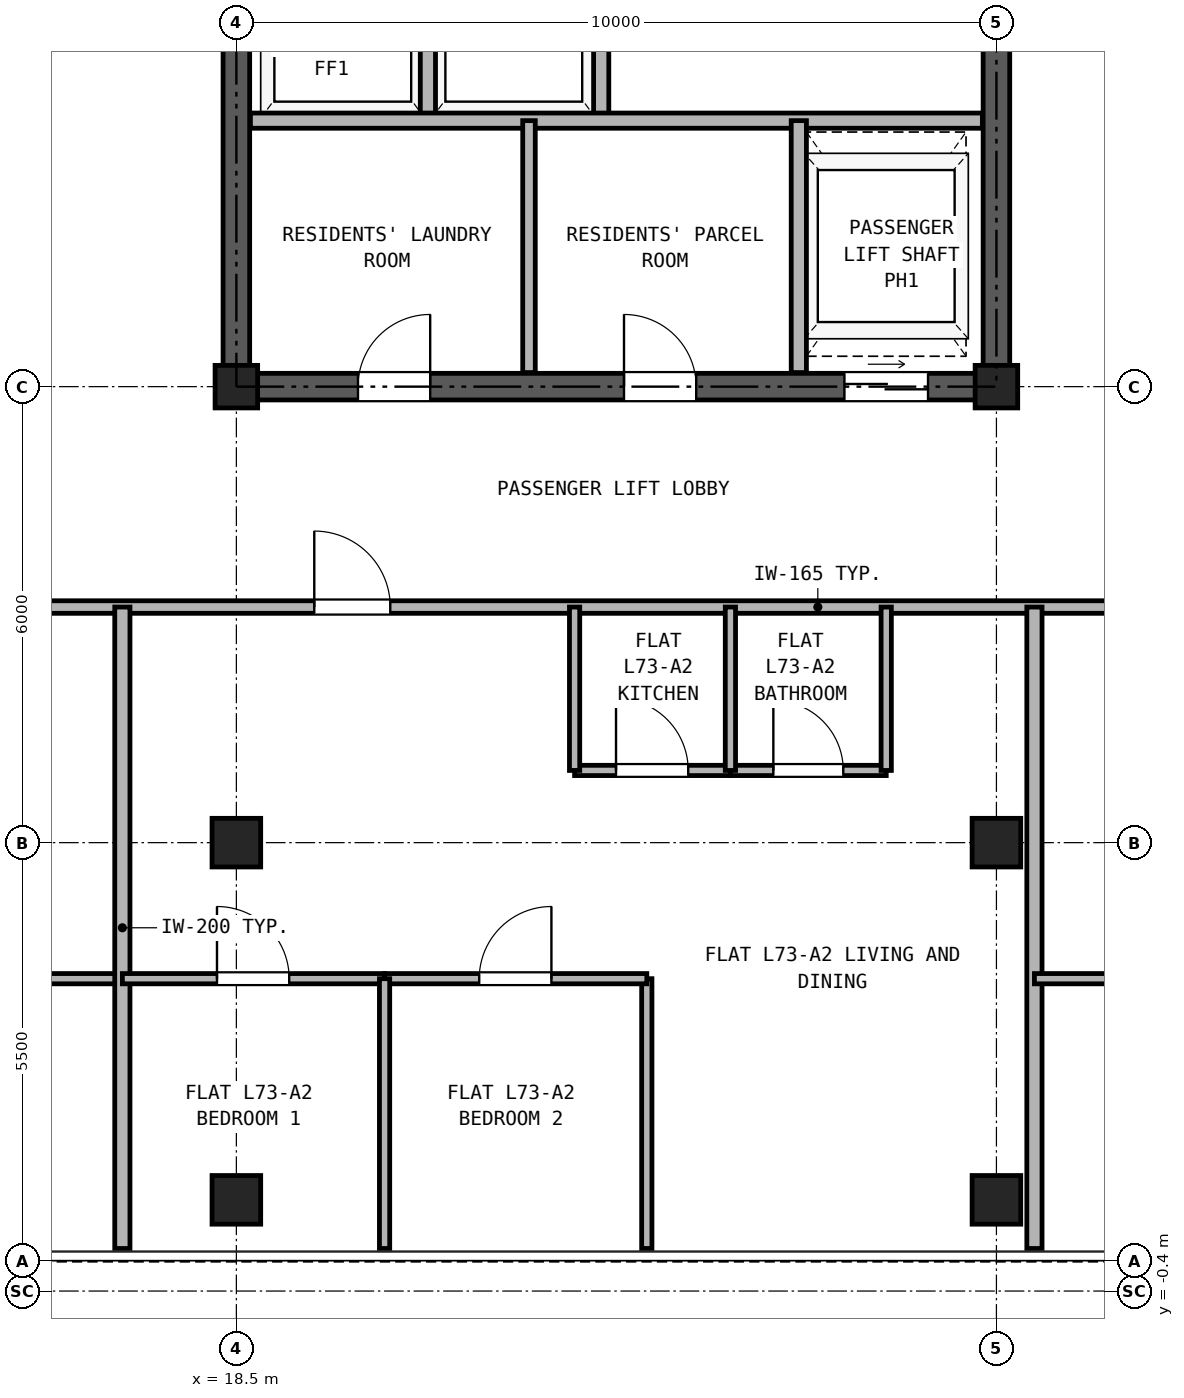
"""IFC4 building model, lengths in metres.
Left out: names, types, materials, properties, quantities, classifications, styles, units other than length and angle.
Written with IfcOpenShell. Run it as: python <this file> out.ifc"""

import sys

from ifc_helpers import new_model, si_unit, direction, frame, frame_2d, origin, origin_2d, place, context, subcontext, project, spatial, rectangle, hollow_rectangle, extrude, source, transform, mapped, element, fill, save


model = new_model("IFC4")
c1 = context("Model", 3, precision=1e-05, world=origin(), true_north=direction((0.0, 1.0)))
c2 = subcontext(c1, "Body", "Model", "MODEL_VIEW")
j1 = project(units=[si_unit("LENGTHUNIT", "METRE"), si_unit("PLANEANGLEUNIT", "RADIAN")], contexts=[c1])
p1 = place(None, origin())
s1 = spatial("IfcSite", under=j1, at=p1, CompositionType="ELEMENT")
p2 = place(p1, origin())
s2 = spatial("IfcBuilding", under=s1, at=p2, CompositionType="ELEMENT")
p3 = place(p2, frame((0.0, 0.0, 255.3)))
s3 = spatial("IfcBuildingStorey", under=s2, at=p3, CompositionType="ELEMENT", Elevation=255.3)
m1 = source(origin(), c2, "Body", "SweptSolid", [
    extrude(hollow_rectangle(XDim=0.64, YDim=0.64, WallThickness=0.035, at=origin_2d()), origin(), (0.0, 0.0, 1.0), 2.98),
])
for number, where, z_axis, x_axis in (
    (1, (18.5, 0.8, 0.0), (0.0, 0.0, 1.0), (1.0, 0.0, 0.0)),
    (2, (28.5, 0.8, 0.0), (0.0, 0.0, 1.0), (1.0, 0.0, 0.0)),
    (3, (18.5, 5.5, 0.0), (0.0, 0.0, 1.0), (1.0, 0.0, 0.0)),
):
    element("IfcColumn", number, at=place(p3, frame(where, z_axis=z_axis, x_axis=x_axis)), inside=s3, PredefinedType="COLUMN", context=c2, shape_type="MappedRepresentation", body=[
        mapped(m1, transform((0.0, 0.0, 0.0), x_axis=(1.0, 0.0, 0.0), y_axis=(0.0, 1.0, 0.0), z_axis=(0.0, 0.0, 1.0), scale=1.0)),
    ])
m2 = source(origin(), c2, "Body", "SweptSolid", [
    extrude(hollow_rectangle(XDim=0.56, YDim=0.56, WallThickness=0.03, at=origin_2d()), origin(), (0.0, 0.0, 1.0), 2.98),
])
p4 = place(p3, frame((18.5, 11.5, 0.0), z_axis=(0.0, 0.0, 1.0), x_axis=(1.0, 0.0, 0.0)))
e4 = element("IfcColumn", 4, at=p4, inside=s3, PredefinedType="COLUMN", context=c2, shape_type="MappedRepresentation", body=[
    mapped(m2, transform((0.0, 0.0, 0.0), x_axis=(1.0, 0.0, 0.0), y_axis=(0.0, 1.0, 0.0), z_axis=(0.0, 0.0, 1.0), scale=1.0)),
])
p5 = place(p3, frame((28.5, 5.5, 0.0), z_axis=(0.0, 0.0, 1.0), x_axis=(1.0, 0.0, 0.0)))
e5 = element("IfcColumn", 5, at=p5, inside=s3, PredefinedType="COLUMN", context=c2, shape_type="MappedRepresentation", body=[
    mapped(m1, transform((0.0, 0.0, 0.0), x_axis=(1.0, 0.0, 0.0), y_axis=(0.0, 1.0, 0.0), z_axis=(0.0, 0.0, 1.0), scale=1.0)),
])
p6 = place(p3, frame((28.5, 11.5, 0.0), z_axis=(0.0, 0.0, 1.0), x_axis=(1.0, 0.0, 0.0)))
e6 = element("IfcColumn", 6, at=p6, inside=s3, PredefinedType="COLUMN", context=c2, shape_type="MappedRepresentation", body=[
    mapped(m2, transform((0.0, 0.0, 0.0), x_axis=(1.0, 0.0, 0.0), y_axis=(0.0, 1.0, 0.0), z_axis=(0.0, 0.0, 1.0), scale=1.0)),
])
p7 = place(p3, frame((18.325, 11.5, 0.0), z_axis=(0.0, 0.0, 1.0), x_axis=(1.0, 0.0, 0.0)))
e7 = element("IfcWall", 7, at=p7, inside=s3, PredefinedType="SHEAR", context=c2, shape_type="SweptSolid", body=[
    extrude(rectangle(XDim=10.35, YDim=0.35, at=frame_2d((5.175, 0.0))), origin(), (0.0, 0.0, 1.0), 2.98),
])
p8 = place(p7, frame((1.775, 0.0, 0.0)))
e8 = element("IfcOpeningElement", 8, at=p8, cuts=e7, PredefinedType="OPENING", context=c2, shape_type="SweptSolid", body=[
    extrude(rectangle(XDim=0.95, YDim=2.15, at=frame_2d((0.475, 1.075))), frame((0.0, 0.185, 0.0), z_axis=(0.0, -1.0, 0.0), x_axis=(1.0, 0.0, 0.0)), (0.0, 0.0, 1.0), 0.37),
])
p9 = place(p7, frame((5.275, 0.0, 0.0)))
e9 = element("IfcOpeningElement", 9, at=p9, cuts=e7, PredefinedType="OPENING", context=c2, shape_type="SweptSolid", body=[
    extrude(rectangle(XDim=0.95, YDim=2.15, at=frame_2d((0.475, 1.075))), frame((0.0, 0.185, 0.0), z_axis=(0.0, -1.0, 0.0), x_axis=(1.0, 0.0, 0.0)), (0.0, 0.0, 1.0), 0.37),
])
p10 = place(p7, frame((8.175, 0.0, 0.0)))
e10 = element("IfcOpeningElement", 10, at=p10, cuts=e7, PredefinedType="OPENING", context=c2, shape_type="SweptSolid", body=[
    extrude(rectangle(XDim=1.1, YDim=2.25, at=frame_2d((0.55, 1.125))), frame((0.0, 0.185, 0.0), z_axis=(0.0, -1.0, 0.0), x_axis=(1.0, 0.0, 0.0)), (0.0, 0.0, 1.0), 0.37),
])
p11 = place(p3, frame((18.5, 11.675, 0.0), z_axis=(0.0, 0.0, 1.0), x_axis=(0.0, 1.0, 0.0)))
e11 = element("IfcWall", 11, at=p11, inside=s3, PredefinedType="SHEAR", context=c2, shape_type="SweptSolid", body=[
    extrude(rectangle(XDim=16.9, YDim=0.35, at=frame_2d((8.45, 0.0))), origin(), (0.0, 0.0, 1.0), 2.98),
])
p12 = place(p11, frame((7.475, 0.0, 0.0)))
e12 = element("IfcOpeningElement", 12, at=p12, cuts=e11, PredefinedType="OPENING", context=c2, shape_type="SweptSolid", body=[
    extrude(rectangle(XDim=1.15, YDim=2.2, at=frame_2d((0.575, 1.1))), frame((0.0, 0.185, 0.0), z_axis=(0.0, -1.0, 0.0), x_axis=(1.0, 0.0, 0.0)), (0.0, 0.0, 1.0), 0.37),
])
p13 = place(p3, frame((28.5, 11.675, 0.0), z_axis=(0.0, 0.0, 1.0), x_axis=(0.0, 1.0, 0.0)))
e13 = element("IfcWall", 13, at=p13, inside=s3, PredefinedType="SHEAR", context=c2, shape_type="SweptSolid", body=[
    extrude(rectangle(XDim=16.9, YDim=0.35, at=frame_2d((8.45, 0.0))), origin(), (0.0, 0.0, 1.0), 2.98),
])
p14 = place(p13, frame((7.475, 0.0, 0.0)))
e14 = element("IfcOpeningElement", 14, at=p14, cuts=e13, PredefinedType="OPENING", context=c2, shape_type="SweptSolid", body=[
    extrude(rectangle(XDim=1.15, YDim=2.2, at=frame_2d((0.575, 1.1))), frame((0.0, 0.185, 0.0), z_axis=(0.0, -1.0, 0.0), x_axis=(1.0, 0.0, 0.0)), (0.0, 0.0, 1.0), 0.37),
])
for number, where, z_axis, x_axis in (
    (15, (21.02, 15.0, 0.0), (0.0, 0.0, 1.0), (0.0, 1.0, 0.0)),
    (16, (23.3, 15.0, 0.0), (0.0, 0.0, 1.0), (0.0, 1.0, 0.0)),
):
    element("IfcWall", number, at=place(p3, frame(where, z_axis=z_axis, x_axis=x_axis)), inside=s3, PredefinedType="PARTITIONING", context=c2, shape_type="SweptSolid", body=[
        extrude(rectangle(XDim=3.0, YDim=0.2, at=frame_2d((1.5, 0.0))), origin(), (0.0, 0.0, 1.0), 2.98),
    ])
p15 = place(p3, frame((18.685, 15.0, 0.0), z_axis=(0.0, 0.0, 1.0), x_axis=(1.0, 0.0, 0.0)))
e17 = element("IfcWall", 17, at=p15, inside=s3, PredefinedType="PARTITIONING", context=c2, shape_type="SweptSolid", body=[
    extrude(rectangle(XDim=9.63, YDim=0.2, at=frame_2d((4.815, 0.0))), origin(), (0.0, 0.0, 1.0), 2.98),
])
p16 = place(p3, frame((22.35, 11.685, 0.0), z_axis=(0.0, 0.0, 1.0), x_axis=(0.0, 1.0, 0.0)))
e18 = element("IfcWall", 18, at=p16, inside=s3, PredefinedType="PARTITIONING", context=c2, shape_type="SweptSolid", body=[
    extrude(rectangle(XDim=3.315, YDim=0.165, at=frame_2d((1.657, 0.0))), origin(), (0.0, 0.0, 1.0), 2.98),
])
p17 = place(p3, frame((25.9, 11.685, 0.0), z_axis=(0.0, 0.0, 1.0), x_axis=(0.0, 1.0, 0.0)))
e19 = element("IfcWall", 19, at=p17, inside=s3, PredefinedType="PARTITIONING", context=c2, shape_type="SweptSolid", body=[
    extrude(rectangle(XDim=3.315, YDim=0.2, at=frame_2d((1.657, 0.0))), origin(), (0.0, 0.0, 1.0), 2.98),
])
p18 = place(p3, frame((5.36, 8.6, 0.0), z_axis=(0.0, 0.0, 1.0), x_axis=(1.0, 0.0, 0.0)))
e20 = element("IfcWall", 20, at=p18, inside=s3, PredefinedType="PARTITIONING", context=c2, shape_type="SweptSolid", body=[
    extrude(rectangle(XDim=36.28, YDim=0.165, at=frame_2d((18.14, 0.0))), origin(), (0.0, 0.0, 1.0), 2.655),
])
p19 = place(p18, frame((8.365, 0.0, 0.0)))
e21 = element("IfcOpeningElement", 21, at=p19, cuts=e20, PredefinedType="OPENING", context=c2, shape_type="SweptSolid", body=[
    extrude(rectangle(XDim=1.0, YDim=2.15, at=frame_2d((0.5, 1.075))), frame((0.0, 0.093, 0.0), z_axis=(0.0, -1.0, 0.0), x_axis=(1.0, 0.0, 0.0)), (0.0, 0.0, 1.0), 0.185),
])
p20 = place(p18, frame((14.165, 0.0, 0.0)))
e22 = element("IfcOpeningElement", 22, at=p20, cuts=e20, PredefinedType="OPENING", context=c2, shape_type="SweptSolid", body=[
    extrude(rectangle(XDim=1.0, YDim=2.15, at=frame_2d((0.5, 1.075))), frame((0.0, 0.093, 0.0), z_axis=(0.0, -1.0, 0.0), x_axis=(1.0, 0.0, 0.0)), (0.0, 0.0, 1.0), 0.185),
])
p21 = place(p18, frame((26.415, 0.0, 0.0)))
e23 = element("IfcOpeningElement", 23, at=p21, cuts=e20, PredefinedType="OPENING", context=c2, shape_type="SweptSolid", body=[
    extrude(rectangle(XDim=1.0, YDim=2.15, at=frame_2d((0.5, 1.075))), frame((0.0, 0.093, 0.0), z_axis=(0.0, -1.0, 0.0), x_axis=(1.0, 0.0, 0.0)), (0.0, 0.0, 1.0), 0.185),
])
p22 = place(p3, frame((13.55, 3.71, 0.0), z_axis=(0.0, 0.0, 1.0), x_axis=(1.0, 0.0, 0.0)))
e24 = element("IfcWall", 24, at=p22, inside=s3, PredefinedType="PARTITIONING", context=c2, shape_type="SweptSolid", body=[
    extrude(rectangle(XDim=3.45, YDim=0.135, at=frame_2d((1.725, 0.0))), origin(), (0.0, 0.0, 1.0), 2.98),
])
p23 = place(p22, frame((1.245, 0.0, 0.0)))
e25 = element("IfcOpeningElement", 25, at=p23, cuts=e24, PredefinedType="OPENING", context=c2, shape_type="SweptSolid", body=[
    extrude(rectangle(XDim=0.95, YDim=2.15, at=frame_2d((0.475, 1.075))), frame((0.0, 0.077, 0.0), z_axis=(0.0, -1.0, 0.0), x_axis=(1.0, 0.0, 0.0)), (0.0, 0.0, 1.0), 0.155),
])
p24 = place(p3, frame((17.0, 0.16, 0.0), z_axis=(0.0, 0.0, 1.0), x_axis=(0.0, 1.0, 0.0)))
e26 = element("IfcWall", 26, at=p24, inside=s3, PredefinedType="PARTITIONING", context=c2, shape_type="SweptSolid", body=[
    extrude(rectangle(XDim=8.44, YDim=0.2, at=frame_2d((4.22, 0.0))), origin(), (0.0, 0.0, 1.0), 2.98),
])
p25 = place(p3, frame((22.95, 6.45, 0.0), z_axis=(0.0, 0.0, 1.0), x_axis=(1.0, 0.0, 0.0)))
e27 = element("IfcWall", 27, at=p25, inside=s3, PredefinedType="PARTITIONING", context=c2, shape_type="SweptSolid", body=[
    extrude(rectangle(XDim=2.05, YDim=0.135, at=frame_2d((1.025, 0.0))), origin(), (0.0, 0.0, 1.0), 2.98),
])
p26 = place(p25, frame((0.545, 0.0, 0.0)))
e28 = element("IfcOpeningElement", 28, at=p26, cuts=e27, PredefinedType="OPENING", context=c2, shape_type="SweptSolid", body=[
    extrude(rectangle(XDim=0.95, YDim=2.15, at=frame_2d((0.475, 1.075))), frame((0.0, 0.077, 0.0), z_axis=(0.0, -1.0, 0.0), x_axis=(1.0, 0.0, 0.0)), (0.0, 0.0, 1.0), 0.155),
])
p27 = place(p3, frame((25.0, 6.45, 0.0), z_axis=(0.0, 0.0, 1.0), x_axis=(1.0, 0.0, 0.0)))
e29 = element("IfcWall", 29, at=p27, inside=s3, PredefinedType="PARTITIONING", context=c2, shape_type="SweptSolid", body=[
    extrude(rectangle(XDim=2.05, YDim=0.135, at=frame_2d((1.025, 0.0))), origin(), (0.0, 0.0, 1.0), 2.98),
])
p28 = place(p27, frame((0.565, 0.0, 0.0)))
e30 = element("IfcOpeningElement", 30, at=p28, cuts=e29, PredefinedType="OPENING", context=c2, shape_type="SweptSolid", body=[
    extrude(rectangle(XDim=0.92, YDim=2.1, at=frame_2d((0.46, 1.05))), frame((0.0, 0.077, 0.0), z_axis=(0.0, -1.0, 0.0), x_axis=(1.0, 0.0, 0.0)), (0.0, 0.0, 1.0), 0.155),
])
for number, where, z_axis, x_axis in (
    (31, (22.95, 6.45, 0.0), (0.0, 0.0, 1.0), (0.0, 1.0, 0.0)),
    (32, (25.0, 6.45, 0.0), (0.0, 0.0, 1.0), (0.0, 1.0, 0.0)),
    (33, (27.05, 6.45, 0.0), (0.0, 0.0, 1.0), (0.0, 1.0, 0.0)),
):
    element("IfcWall", number, at=place(p3, frame(where, z_axis=z_axis, x_axis=x_axis)), inside=s3, PredefinedType="PARTITIONING", context=c2, shape_type="SweptSolid", body=[
        extrude(rectangle(XDim=2.15, YDim=0.135, at=frame_2d((1.075, 0.0))), origin(), (0.0, 0.0, 1.0), 2.98),
    ])
p29 = place(p3, frame((23.9, 0.16, 0.0), z_axis=(0.0, 0.0, 1.0), x_axis=(0.0, 1.0, 0.0)))
e34 = element("IfcWall", 34, at=p29, inside=s3, PredefinedType="PARTITIONING", context=c2, shape_type="SweptSolid", body=[
    extrude(rectangle(XDim=3.55, YDim=0.135, at=frame_2d((1.775, 0.0))), origin(), (0.0, 0.0, 1.0), 2.98),
])
p30 = place(p3, frame((17.0, 3.71, 0.0), z_axis=(0.0, 0.0, 1.0), x_axis=(1.0, 0.0, 0.0)))
e35 = element("IfcWall", 35, at=p30, inside=s3, PredefinedType="PARTITIONING", context=c2, shape_type="SweptSolid", body=[
    extrude(rectangle(XDim=3.45, YDim=0.135, at=frame_2d((1.725, 0.0))), origin(), (0.0, 0.0, 1.0), 2.98),
])
p31 = place(p30, frame((1.245, 0.0, 0.0)))
e36 = element("IfcOpeningElement", 36, at=p31, cuts=e35, PredefinedType="OPENING", context=c2, shape_type="SweptSolid", body=[
    extrude(rectangle(XDim=0.95, YDim=2.15, at=frame_2d((0.475, 1.075))), frame((0.0, 0.077, 0.0), z_axis=(0.0, -1.0, 0.0), x_axis=(1.0, 0.0, 0.0)), (0.0, 0.0, 1.0), 0.155),
])
p32 = place(p3, frame((20.45, 3.71, 0.0), z_axis=(0.0, 0.0, 1.0), x_axis=(1.0, 0.0, 0.0)))
e37 = element("IfcWall", 37, at=p32, inside=s3, PredefinedType="PARTITIONING", context=c2, shape_type="SweptSolid", body=[
    extrude(rectangle(XDim=3.45, YDim=0.135, at=frame_2d((1.725, 0.0))), origin(), (0.0, 0.0, 1.0), 2.98),
])
p33 = place(p32, frame((1.245, 0.0, 0.0)))
e38 = element("IfcOpeningElement", 38, at=p33, cuts=e37, PredefinedType="OPENING", context=c2, shape_type="SweptSolid", body=[
    extrude(rectangle(XDim=0.95, YDim=2.15, at=frame_2d((0.475, 1.075))), frame((0.0, 0.077, 0.0), z_axis=(0.0, -1.0, 0.0), x_axis=(1.0, 0.0, 0.0)), (0.0, 0.0, 1.0), 0.155),
])
p34 = place(p3, frame((20.45, 0.16, 0.0), z_axis=(0.0, 0.0, 1.0), x_axis=(0.0, 1.0, 0.0)))
e39 = element("IfcWall", 39, at=p34, inside=s3, PredefinedType="PARTITIONING", context=c2, shape_type="SweptSolid", body=[
    extrude(rectangle(XDim=3.55, YDim=0.135, at=frame_2d((1.775, 0.0))), origin(), (0.0, 0.0, 1.0), 2.98),
])
p35 = place(p3, frame((29.0, 0.16, 0.0), z_axis=(0.0, 0.0, 1.0), x_axis=(0.0, 1.0, 0.0)))
e40 = element("IfcWall", 40, at=p35, inside=s3, PredefinedType="PARTITIONING", context=c2, shape_type="SweptSolid", body=[
    extrude(rectangle(XDim=8.44, YDim=0.2, at=frame_2d((4.22, 0.0))), origin(), (0.0, 0.0, 1.0), 2.98),
])
p36 = place(p3, frame((29.0, 3.71, 0.0), z_axis=(0.0, 0.0, 1.0), x_axis=(1.0, 0.0, 0.0)))
e41 = element("IfcWall", 41, at=p36, inside=s3, PredefinedType="PARTITIONING", context=c2, shape_type="SweptSolid", body=[
    extrude(rectangle(XDim=5.549, YDim=0.135, at=frame_2d((2.774, 0.0))), origin(), (0.0, 0.0, 1.0), 2.98),
])
p37 = place(p36, frame((2.294, 0.0, 0.0)))
e42 = element("IfcOpeningElement", 42, at=p37, cuts=e41, PredefinedType="OPENING", context=c2, shape_type="SweptSolid", body=[
    extrude(rectangle(XDim=0.95, YDim=2.15, at=frame_2d((0.475, 1.075))), frame((0.0, 0.077, 0.0), z_axis=(0.0, -1.0, 0.0), x_axis=(1.0, 0.0, 0.0)), (0.0, 0.0, 1.0), 0.155),
])
p38 = place(p8, frame((0.95, 0.0, 0.0), z_axis=(0.0, 0.0, 1.0), x_axis=(-1.0, 0.0, 0.0)))
e43 = element("IfcDoor", 43, at=p38, inside=s3, OperationType="SINGLE_SWING_RIGHT", PredefinedType="DOOR", context=c2, shape_type="SweptSolid", body=[
    extrude(rectangle(XDim=0.95, YDim=2.15, at=frame_2d((0.475, 1.075))), frame((0.0, 0.025, 0.0), z_axis=(0.0, -1.0, 0.0), x_axis=(1.0, 0.0, 0.0)), (0.0, 0.0, 1.0), 0.05),
])
fill(e8, e43)
p39 = place(p9, frame((0.95, 0.0, 0.0), z_axis=(0.0, 0.0, 1.0), x_axis=(-1.0, 0.0, 0.0)))
e44 = element("IfcDoor", 44, at=p39, inside=s3, OperationType="SINGLE_SWING_LEFT", PredefinedType="DOOR", context=c2, shape_type="SweptSolid", body=[
    extrude(rectangle(XDim=0.95, YDim=2.15, at=frame_2d((0.475, 1.075))), frame((0.0, 0.025, 0.0), z_axis=(0.0, -1.0, 0.0), x_axis=(1.0, 0.0, 0.0)), (0.0, 0.0, 1.0), 0.05),
])
fill(e9, e44)
p40 = place(p10, frame((1.1, 0.0, 0.0), z_axis=(0.0, 0.0, 1.0), x_axis=(-1.0, 0.0, 0.0)))
e45 = element("IfcDoor", 45, at=p40, inside=s3, OperationType="DOUBLE_DOOR_SLIDING", PredefinedType="DOOR", context=c2, shape_type="SweptSolid", body=[
    extrude(rectangle(XDim=1.1, YDim=2.25, at=frame_2d((0.55, 1.125))), frame((0.0, 0.025, 0.0), z_axis=(0.0, -1.0, 0.0), x_axis=(1.0, 0.0, 0.0)), (0.0, 0.0, 1.0), 0.05),
])
fill(e10, e45)
p41 = place(p26, origin())
e46 = element("IfcDoor", 46, at=p41, inside=s3, OperationType="SINGLE_SWING_LEFT", PredefinedType="DOOR", context=c2, shape_type="SweptSolid", body=[
    extrude(rectangle(XDim=0.95, YDim=2.15, at=frame_2d((0.475, 1.075))), frame((0.0, 0.025, 0.0), z_axis=(0.0, -1.0, 0.0), x_axis=(1.0, 0.0, 0.0)), (0.0, 0.0, 1.0), 0.05),
])
fill(e28, e46)
p42 = place(p28, origin())
e47 = element("IfcDoor", 47, at=p42, inside=s3, OperationType="SINGLE_SWING_LEFT", PredefinedType="DOOR", context=c2, shape_type="SweptSolid", body=[
    extrude(rectangle(XDim=0.92, YDim=2.1, at=frame_2d((0.46, 1.05))), frame((0.0, 0.025, 0.0), z_axis=(0.0, -1.0, 0.0), x_axis=(1.0, 0.0, 0.0)), (0.0, 0.0, 1.0), 0.05),
])
fill(e30, e47)
p43 = place(p31, frame((0.95, 0.0, 0.0), z_axis=(0.0, 0.0, 1.0), x_axis=(-1.0, 0.0, 0.0)))
e48 = element("IfcDoor", 48, at=p43, inside=s3, OperationType="SINGLE_SWING_LEFT", PredefinedType="DOOR", context=c2, shape_type="SweptSolid", body=[
    extrude(rectangle(XDim=0.95, YDim=2.15, at=frame_2d((0.475, 1.075))), frame((0.0, 0.025, 0.0), z_axis=(0.0, -1.0, 0.0), x_axis=(1.0, 0.0, 0.0)), (0.0, 0.0, 1.0), 0.05),
])
fill(e36, e48)
p44 = place(p33, frame((0.95, 0.0, 0.0), z_axis=(0.0, 0.0, 1.0), x_axis=(-1.0, 0.0, 0.0)))
e49 = element("IfcDoor", 49, at=p44, inside=s3, OperationType="SINGLE_SWING_RIGHT", PredefinedType="DOOR", context=c2, shape_type="SweptSolid", body=[
    extrude(rectangle(XDim=0.95, YDim=2.15, at=frame_2d((0.475, 1.075))), frame((0.0, 0.025, 0.0), z_axis=(0.0, -1.0, 0.0), x_axis=(1.0, 0.0, 0.0)), (0.0, 0.0, 1.0), 0.05),
])
fill(e38, e49)
p45 = place(p20, frame((1.0, 0.0, 0.0), z_axis=(0.0, 0.0, 1.0), x_axis=(-1.0, 0.0, 0.0)))
e50 = element("IfcDoor", 50, at=p45, inside=s3, OperationType="SINGLE_SWING_LEFT", PredefinedType="DOOR", context=c2, shape_type="SweptSolid", body=[
    extrude(rectangle(XDim=1.0, YDim=2.15, at=frame_2d((0.5, 1.075))), frame((0.0, 0.025, 0.0), z_axis=(0.0, -1.0, 0.0), x_axis=(1.0, 0.0, 0.0)), (0.0, 0.0, 1.0), 0.05),
])
fill(e22, e50)
save(model, sys.argv[1])
